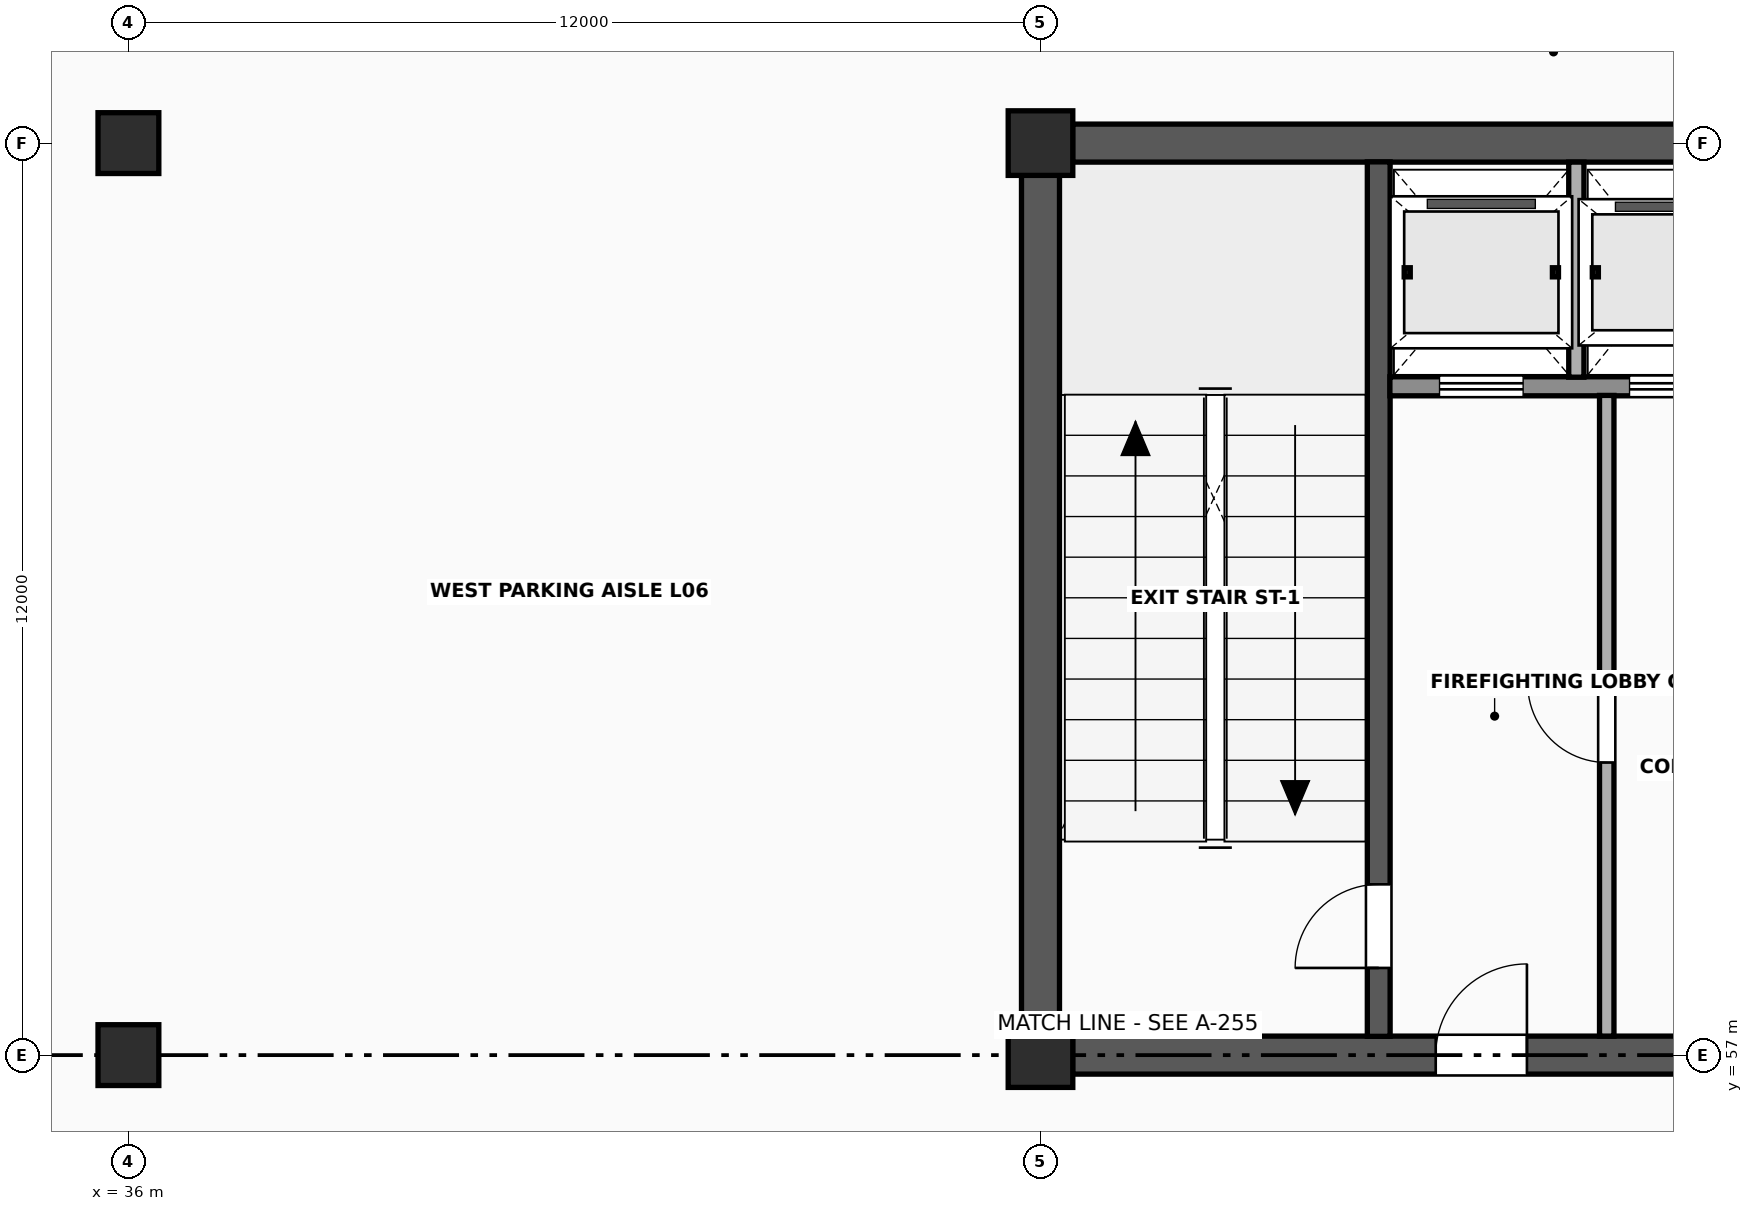
"""IFC4 building model, lengths in metres.
Left out: names, types, materials, properties, quantities, classifications, styles, units other than length and angle.
Written with IfcOpenShell. Run it as: python <this file> out.ifc"""

import sys

from ifc_helpers import new_model, si_unit, direction, frame, frame_2d, origin, origin_2d, place, context, subcontext, project, spatial, rectangle, extrude, element, fill, save


model = new_model("IFC4")
c1 = context("Model", 3, precision=1e-05, world=origin(), true_north=direction((0.0, 1.0)))
c2 = subcontext(c1, "Body", "Model", "MODEL_VIEW")
j1 = project(units=[si_unit("LENGTHUNIT", "METRE"), si_unit("PLANEANGLEUNIT", "RADIAN")], contexts=[c1])
p1 = place(None, origin())
s1 = spatial("IfcSite", under=j1, at=p1, CompositionType="ELEMENT")
p2 = place(p1, origin())
s2 = spatial("IfcBuilding", under=s1, at=p2, CompositionType="ELEMENT")
p3 = place(p2, frame((0.0, 0.0, 24.8)))
s3 = spatial("IfcBuildingStorey", under=s2, at=p3, CompositionType="ELEMENT", Elevation=24.8)
for number, where, z_axis, x_axis in (
    (1, (36.0, 57.0, 0.0), (0.0, 0.0, 1.0), (1.0, 0.0, 0.0)),
    (2, (36.0, 69.0, 0.0), (0.0, 0.0, 1.0), (1.0, 0.0, 0.0)),
):
    element("IfcColumn", number, at=place(p3, frame(where, z_axis=z_axis, x_axis=x_axis)), inside=s3, PredefinedType="COLUMN", context=c2, shape_type="SweptSolid", body=[
        extrude(rectangle(XDim=0.8, YDim=0.8, at=origin_2d()), origin(), (0.0, 0.0, 1.0), 3.8),
    ])
for number, where, z_axis, x_axis in (
    (3, (48.0, 57.0, 0.0), (0.0, 0.0, 1.0), (1.0, 0.0, 0.0)),
    (4, (48.0, 69.0, 0.0), (0.0, 0.0, 1.0), (1.0, 0.0, 0.0)),
):
    element("IfcColumn", number, at=place(p3, frame(where, z_axis=z_axis, x_axis=x_axis)), inside=s3, PredefinedType="COLUMN", context=c2, shape_type="SweptSolid", body=[
        extrude(rectangle(XDim=0.85, YDim=0.85, at=origin_2d()), origin(), (0.0, 0.0, 1.0), 3.8),
    ])
p4 = place(p3, frame((48.422, 57.0, 0.0), z_axis=(0.0, 0.0, 1.0), x_axis=(1.0, 0.0, 0.0)))
e5 = element("IfcWall", 5, at=p4, inside=s3, PredefinedType="SHEAR", context=c2, shape_type="SweptSolid", body=[
    extrude(rectangle(XDim=11.156, YDim=0.5, at=frame_2d((5.578, 0.0))), origin(), (0.0, 0.0, 1.0), 3.628),
])
p5 = place(p4, frame((4.778, 0.0, 0.0)))
e6 = element("IfcOpeningElement", 6, at=p5, cuts=e5, PredefinedType="OPENING", context=c2, shape_type="SweptSolid", body=[
    extrude(rectangle(XDim=1.2, YDim=2.2, at=frame_2d((0.6, 1.1))), frame((0.0, 0.265, 0.0), z_axis=(0.0, -1.0, 0.0), x_axis=(1.0, 0.0, 0.0)), (0.0, 0.0, 1.0), 0.53),
])
p6 = place(p4, frame((8.478, 0.0, 0.0)))
e7 = element("IfcOpeningElement", 7, at=p6, cuts=e5, PredefinedType="OPENING", context=c2, shape_type="SweptSolid", body=[
    extrude(rectangle(XDim=1.5, YDim=2.25, at=frame_2d((0.75, 1.125))), frame((0.0, 0.265, 0.0), z_axis=(0.0, -1.0, 0.0), x_axis=(1.0, 0.0, 0.0)), (0.0, 0.0, 1.0), 0.53),
])
for number, where, z_axis, x_axis in (
    (8, (48.422, 69.0, 0.0), (0.0, 0.0, 1.0), (1.0, 0.0, 0.0)),
    (9, (48.0, 57.422, 0.0), (0.0, 0.0, 1.0), (0.0, 1.0, 0.0)),
):
    element("IfcWall", number, at=place(p3, frame(where, z_axis=z_axis, x_axis=x_axis)), inside=s3, PredefinedType="SHEAR", context=c2, shape_type="SweptSolid", body=[
        extrude(rectangle(XDim=11.156, YDim=0.5, at=frame_2d((5.578, 0.0))), origin(), (0.0, 0.0, 1.0), 3.628),
    ])
p7 = place(p3, frame((52.45, 57.247, 0.0), z_axis=(0.0, 0.0, 1.0), x_axis=(0.0, 1.0, 0.0)))
e10 = element("IfcWall", 10, at=p7, inside=s3, PredefinedType="SHEAR", context=c2, shape_type="SweptSolid", body=[
    extrude(rectangle(XDim=11.506, YDim=0.3, at=frame_2d((5.753, 0.0))), origin(), (0.0, 0.0, 1.0), 3.628),
])
p8 = place(p7, frame((0.9, 0.0, 0.0)))
e11 = element("IfcOpeningElement", 11, at=p8, cuts=e10, PredefinedType="OPENING", context=c2, shape_type="SweptSolid", body=[
    extrude(rectangle(XDim=1.1, YDim=2.2, at=frame_2d((0.55, 1.1))), frame((0.0, 0.165, 0.0), z_axis=(0.0, -1.0, 0.0), x_axis=(1.0, 0.0, 0.0)), (0.0, 0.0, 1.0), 0.33),
])
p9 = place(p3, frame((52.597, 65.8, 0.0), z_axis=(0.0, 0.0, 1.0), x_axis=(1.0, 0.0, 0.0)))
e12 = element("IfcWall", 12, at=p9, inside=s3, PredefinedType="SOLIDWALL", context=c2, shape_type="SweptSolid", body=[
    extrude(rectangle(XDim=7.156, YDim=0.25, at=frame_2d((3.578, 0.0))), origin(), (0.0, 0.0, 1.0), 3.628),
])
p10 = place(p9, frame((0.653, 0.0, 0.0)))
e13 = element("IfcOpeningElement", 13, at=p10, cuts=e12, PredefinedType="OPENING", context=c2, shape_type="SweptSolid", body=[
    extrude(rectangle(XDim=1.1, YDim=2.24, at=frame_2d((0.55, 1.12))), frame((0.0, 0.14, 0.0), z_axis=(0.0, -1.0, 0.0), x_axis=(1.0, 0.0, 0.0)), (0.0, 0.0, 1.0), 0.28),
])
p11 = place(p9, frame((3.153, 0.0, 0.0)))
e14 = element("IfcOpeningElement", 14, at=p11, cuts=e12, PredefinedType="OPENING", context=c2, shape_type="SweptSolid", body=[
    extrude(rectangle(XDim=1.05, YDim=2.2, at=frame_2d((0.525, 1.1))), frame((0.0, 0.14, 0.0), z_axis=(0.0, -1.0, 0.0), x_axis=(1.0, 0.0, 0.0)), (0.0, 0.0, 1.0), 0.28),
])
p12 = place(p9, frame((5.528, 0.0, 0.0)))
e15 = element("IfcOpeningElement", 15, at=p12, cuts=e12, PredefinedType="OPENING", context=c2, shape_type="SweptSolid", body=[
    extrude(rectangle(XDim=1.05, YDim=2.2, at=frame_2d((0.525, 1.1))), frame((0.0, 0.14, 0.0), z_axis=(0.0, -1.0, 0.0), x_axis=(1.0, 0.0, 0.0)), (0.0, 0.0, 1.0), 0.28),
])
p13 = place(p3, frame((55.05, 65.92, 0.0), z_axis=(0.0, 0.0, 1.0), x_axis=(0.0, 1.0, 0.0)))
e16 = element("IfcWall", 16, at=p13, inside=s3, PredefinedType="SOLIDWALL", context=c2, shape_type="SweptSolid", body=[
    extrude(rectangle(XDim=2.83, YDim=0.2, at=frame_2d((1.415, 0.0))), origin(), (0.0, 0.0, 1.0), 3.618),
])
p14 = place(p3, frame((55.45, 57.25, 0.0), z_axis=(0.0, 0.0, 1.0), x_axis=(0.0, 1.0, 0.0)))
e17 = element("IfcWall", 17, at=p14, inside=s3, PredefinedType="SOLIDWALL", context=c2, shape_type="SweptSolid", body=[
    extrude(rectangle(XDim=8.43, YDim=0.19, at=frame_2d((4.215, 0.0))), origin(), (0.0, 0.0, 1.0), 3.618),
])
p15 = place(p14, frame((3.6, 0.0, 0.0)))
e18 = element("IfcOpeningElement", 18, at=p15, cuts=e17, PredefinedType="OPENING", context=c2, shape_type="SweptSolid", body=[
    extrude(rectangle(XDim=1.04, YDim=2.18, at=frame_2d((0.52, 1.09))), frame((0.0, 0.11, 0.0), z_axis=(0.0, -1.0, 0.0), x_axis=(1.0, 0.0, 0.0)), (0.0, 0.0, 1.0), 0.22),
])
p16 = place(p8, origin())
e19 = element("IfcDoor", 19, at=p16, inside=s3, OperationType="SINGLE_SWING_LEFT", PredefinedType="DOOR", context=c2, shape_type="SweptSolid", body=[
    extrude(rectangle(XDim=1.1, YDim=2.2, at=frame_2d((0.55, 1.1))), frame((0.0, 0.025, 0.0), z_axis=(0.0, -1.0, 0.0), x_axis=(1.0, 0.0, 0.0)), (0.0, 0.0, 1.0), 0.05),
])
fill(e11, e19)
p17 = place(p15, origin())
e20 = element("IfcDoor", 20, at=p17, inside=s3, OperationType="SINGLE_SWING_RIGHT", PredefinedType="DOOR", context=c2, shape_type="SweptSolid", body=[
    extrude(rectangle(XDim=1.04, YDim=2.18, at=frame_2d((0.52, 1.09))), frame((0.0, 0.025, 0.0), z_axis=(0.0, -1.0, 0.0), x_axis=(1.0, 0.0, 0.0)), (0.0, 0.0, 1.0), 0.05),
])
fill(e18, e20)
p18 = place(p5, origin())
e21 = element("IfcDoor", 21, at=p18, inside=s3, OperationType="SINGLE_SWING_RIGHT", PredefinedType="DOOR", context=c2, shape_type="SweptSolid", body=[
    extrude(rectangle(XDim=1.2, YDim=2.2, at=frame_2d((0.6, 1.1))), frame((0.0, 0.025, 0.0), z_axis=(0.0, -1.0, 0.0), x_axis=(1.0, 0.0, 0.0)), (0.0, 0.0, 1.0), 0.05),
])
fill(e6, e21)
p19 = place(p10, origin())
e22 = element("IfcDoor", 22, at=p19, inside=s3, OperationType="SLIDING_TO_LEFT", PredefinedType="USERDEFINED", context=c2, shape_type="SweptSolid", body=[
    extrude(rectangle(XDim=1.1, YDim=2.24, at=frame_2d((0.55, 1.12))), frame((0.0, 0.025, 0.0), z_axis=(0.0, -1.0, 0.0), x_axis=(1.0, 0.0, 0.0)), (0.0, 0.0, 1.0), 0.05),
])
fill(e13, e22)
p20 = place(p11, origin())
e23 = element("IfcDoor", 23, at=p20, inside=s3, OperationType="SLIDING_TO_LEFT", PredefinedType="USERDEFINED", context=c2, shape_type="SweptSolid", body=[
    extrude(rectangle(XDim=1.05, YDim=2.2, at=frame_2d((0.525, 1.1))), frame((0.0, 0.025, 0.0), z_axis=(0.0, -1.0, 0.0), x_axis=(1.0, 0.0, 0.0)), (0.0, 0.0, 1.0), 0.05),
])
fill(e14, e23)
save(model, sys.argv[1])
